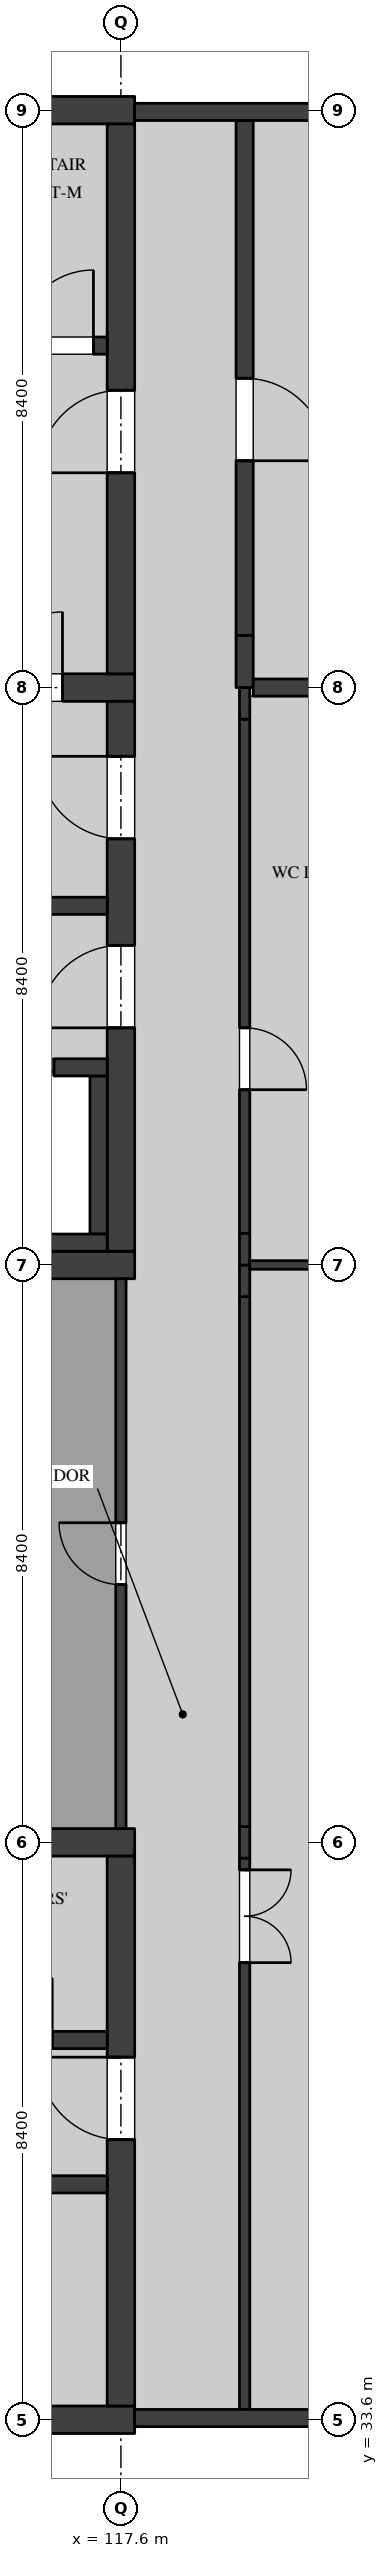
"""IFC4 building model, lengths in metres.
Left out: names, types, materials, properties, quantities, classifications, styles, units other than length and angle.
Written with IfcOpenShell. Run it as: python <this file> out.ifc"""

import sys

from ifc_helpers import new_model, si_unit, direction, frame, frame_2d, origin, place, context, subcontext, project, spatial, rectangle, extrude, element, fill, save


model = new_model("IFC4")
c1 = context("Model", 3, precision=1e-05, world=origin(), true_north=direction((0.0, 1.0)))
c2 = subcontext(c1, "Body", "Model", "MODEL_VIEW")
j1 = project(units=[si_unit("LENGTHUNIT", "METRE"), si_unit("PLANEANGLEUNIT", "RADIAN")], contexts=[c1])
p1 = place(None, origin())
s1 = spatial("IfcSite", under=j1, at=p1, CompositionType="ELEMENT")
p2 = place(p1, origin())
s2 = spatial("IfcBuilding", under=s1, at=p2, CompositionType="ELEMENT")
p3 = place(p2, frame((0.0, 0.0, 23.4)))
s3 = spatial("IfcBuildingStorey", under=s2, at=p3, CompositionType="ELEMENT", Elevation=23.4)
p4 = place(p3, frame((109.0, 50.4, 0.0), z_axis=(0.0, 0.0, 1.0), x_axis=(1.0, 0.0, 0.0)))
e1 = element("IfcWall", 1, at=p4, inside=s3, PredefinedType="SHEAR", context=c2, shape_type="SweptSolid", body=[
    extrude(rectangle(XDim=8.8, YDim=0.4, at=frame_2d((4.4, 0.0))), origin(), (0.0, 0.0, 1.0), 4.37),
])
p5 = place(p3, frame((109.0, 58.8, 0.0), z_axis=(0.0, 0.0, 1.0), x_axis=(1.0, 0.0, 0.0)))
e2 = element("IfcWall", 2, at=p5, inside=s3, PredefinedType="SHEAR", context=c2, shape_type="SweptSolid", body=[
    extrude(rectangle(XDim=8.8, YDim=0.4, at=frame_2d((4.4, 0.0))), origin(), (0.0, 0.0, 1.0), 4.37),
])
p6 = place(p5, frame((6.65, 0.0, 0.0)))
e3 = element("IfcOpeningElement", 3, at=p6, cuts=e2, PredefinedType="OPENING", context=c2, shape_type="SweptSolid", body=[
    extrude(rectangle(XDim=1.1, YDim=2.1, at=frame_2d((0.55, 1.05))), frame((0.0, 0.21, 0.0), z_axis=(0.0, -1.0, 0.0), x_axis=(1.0, 0.0, 0.0)), (0.0, 0.0, 1.0), 0.42),
])
p7 = place(p3, frame((117.6, 50.6, 0.0), z_axis=(0.0, 0.0, 1.0), x_axis=(0.0, 1.0, 0.0)))
e4 = element("IfcWall", 4, at=p7, inside=s3, PredefinedType="SHEAR", context=c2, shape_type="SweptSolid", body=[
    extrude(rectangle(XDim=8.0, YDim=0.4, at=frame_2d((4.0, 0.0))), origin(), (0.0, 0.0, 1.0), 4.37),
])
p8 = place(p7, frame((3.25, 0.0, 0.0)))
e5 = element("IfcOpeningElement", 5, at=p8, cuts=e4, PredefinedType="OPENING", context=c2, shape_type="SweptSolid", body=[
    extrude(rectangle(XDim=1.2, YDim=2.1, at=frame_2d((0.6, 1.05))), frame((0.0, 0.21, 0.0), z_axis=(0.0, -1.0, 0.0), x_axis=(1.0, 0.0, 0.0)), (0.0, 0.0, 1.0), 0.42),
])
p9 = place(p7, frame((6.0, 0.0, 0.0)))
e6 = element("IfcOpeningElement", 6, at=p9, cuts=e4, PredefinedType="OPENING", context=c2, shape_type="SweptSolid", body=[
    extrude(rectangle(XDim=1.2, YDim=2.1, at=frame_2d((0.6, 1.05))), frame((0.0, 0.21, 0.0), z_axis=(0.0, -1.0, 0.0), x_axis=(1.0, 0.0, 0.0)), (0.0, 0.0, 1.0), 0.42),
])
p10 = place(p3, frame((114.75, 55.625, 0.0), z_axis=(0.0, 0.0, 1.0), x_axis=(1.0, 0.0, 0.0)))
e7 = element("IfcWall", 7, at=p10, inside=s3, PredefinedType="SOLIDWALL", context=c2, shape_type="SweptSolid", body=[
    extrude(rectangle(XDim=2.65, YDim=0.25, at=frame_2d((1.325, 0.0))), origin(), (0.0, 0.0, 1.0), 4.37),
])
p11 = place(p3, frame((109.0, 67.2, 0.0), z_axis=(0.0, 0.0, 1.0), x_axis=(1.0, 0.0, 0.0)))
e8 = element("IfcWall", 8, at=p11, inside=s3, PredefinedType="SHEAR", context=c2, shape_type="SweptSolid", body=[
    extrude(rectangle(XDim=8.8, YDim=0.4, at=frame_2d((4.4, 0.0))), origin(), (0.0, 0.0, 1.0), 4.37),
])
p12 = place(p3, frame((117.6, 59.0, 0.0), z_axis=(0.0, 0.0, 1.0), x_axis=(0.0, 1.0, 0.0)))
e9 = element("IfcWall", 9, at=p12, inside=s3, PredefinedType="SHEAR", context=c2, shape_type="SweptSolid", body=[
    extrude(rectangle(XDim=8.0, YDim=0.4, at=frame_2d((4.0, 0.0))), origin(), (0.0, 0.0, 1.0), 4.37),
])
p13 = place(p12, frame((2.925, 0.0, 0.0)))
e10 = element("IfcOpeningElement", 10, at=p13, cuts=e9, PredefinedType="OPENING", context=c2, shape_type="SweptSolid", body=[
    extrude(rectangle(XDim=1.2, YDim=2.1, at=frame_2d((0.6, 1.05))), frame((0.0, 0.21, 0.0), z_axis=(0.0, -1.0, 0.0), x_axis=(1.0, 0.0, 0.0)), (0.0, 0.0, 1.0), 0.42),
])
p14 = place(p3, frame((117.4, 63.775, 0.0), z_axis=(0.0, 0.0, 1.0), x_axis=(-1.0, 0.0, 0.0)))
e11 = element("IfcWall", 11, at=p14, inside=s3, PredefinedType="SOLIDWALL", context=c2, shape_type="SweptSolid", body=[
    extrude(rectangle(XDim=8.0, YDim=0.25, at=frame_2d((4.0, 0.0))), origin(), (0.0, 0.0, 1.0), 4.37),
])
p15 = place(p14, frame((0.2, 0.0, 0.0)))
e12 = element("IfcOpeningElement", 12, at=p15, cuts=e11, PredefinedType="OPENING", context=c2, shape_type="SweptSolid", body=[
    extrude(rectangle(XDim=1.1, YDim=2.1, at=frame_2d((0.55, 1.05))), frame((0.0, 0.135, 0.0), z_axis=(0.0, -1.0, 0.0), x_axis=(1.0, 0.0, 0.0)), (0.0, 0.0, 1.0), 0.27),
])
for number, where, z_axis, x_axis in (
    (13, (109.0, 33.6, 0.0), (0.0, 0.0, 1.0), (1.0, 0.0, 0.0)),
    (14, (109.0, 42.0, 0.0), (0.0, 0.0, 1.0), (1.0, 0.0, 0.0)),
):
    element("IfcWall", number, at=place(p3, frame(where, z_axis=z_axis, x_axis=x_axis)), inside=s3, PredefinedType="SHEAR", context=c2, shape_type="SweptSolid", body=[
        extrude(rectangle(XDim=8.8, YDim=0.4, at=frame_2d((4.4, 0.0))), origin(), (0.0, 0.0, 1.0), 4.37),
    ])
p16 = place(p3, frame((117.6, 33.8, 0.0), z_axis=(0.0, 0.0, 1.0), x_axis=(0.0, 1.0, 0.0)))
e15 = element("IfcWall", 15, at=p16, inside=s3, PredefinedType="SHEAR", context=c2, shape_type="SweptSolid", body=[
    extrude(rectangle(XDim=8.0, YDim=0.4, at=frame_2d((4.0, 0.0))), origin(), (0.0, 0.0, 1.0), 4.37),
])
p17 = place(p16, frame((3.875, 0.0, 0.0)))
e16 = element("IfcOpeningElement", 16, at=p17, cuts=e15, PredefinedType="OPENING", context=c2, shape_type="SweptSolid", body=[
    extrude(rectangle(XDim=1.2, YDim=2.1, at=frame_2d((0.6, 1.05))), frame((0.0, 0.21, 0.0), z_axis=(0.0, -1.0, 0.0), x_axis=(1.0, 0.0, 0.0)), (0.0, 0.0, 1.0), 0.42),
])
p18 = place(p3, frame((109.4, 37.025, 0.0), z_axis=(0.0, 0.0, 1.0), x_axis=(1.0, 0.0, 0.0)))
e17 = element("IfcWall", 17, at=p18, inside=s3, PredefinedType="SOLIDWALL", context=c2, shape_type="SweptSolid", body=[
    extrude(rectangle(XDim=8.0, YDim=0.25, at=frame_2d((4.0, 0.0))), origin(), (0.0, 0.0, 1.0), 4.37),
])
p19 = place(p18, frame((0.2, 0.0, 0.0)))
e18 = element("IfcOpeningElement", 18, at=p19, cuts=e17, PredefinedType="OPENING", context=c2, shape_type="SweptSolid", body=[
    extrude(rectangle(XDim=1.1, YDim=2.1, at=frame_2d((0.55, 1.05))), frame((0.0, 0.135, 0.0), z_axis=(0.0, -1.0, 0.0), x_axis=(1.0, 0.0, 0.0)), (0.0, 0.0, 1.0), 0.27),
])
p20 = place(p3, frame((112.05, 39.125, 0.0), z_axis=(0.0, 0.0, 1.0), x_axis=(1.0, 0.0, 0.0)))
e19 = element("IfcWall", 19, at=p20, inside=s3, PredefinedType="SOLIDWALL", context=c2, shape_type="SweptSolid", body=[
    extrude(rectangle(XDim=5.35, YDim=0.25, at=frame_2d((2.675, 0.0))), origin(), (0.0, 0.0, 1.0), 4.37),
])
p21 = place(p20, frame((3.65, 0.0, 0.0)))
e20 = element("IfcOpeningElement", 20, at=p21, cuts=e19, PredefinedType="OPENING", context=c2, shape_type="SweptSolid", body=[
    extrude(rectangle(XDim=0.9, YDim=2.1, at=frame_2d((0.45, 1.05))), frame((0.0, 0.135, 0.0), z_axis=(0.0, -1.0, 0.0), x_axis=(1.0, 0.0, 0.0)), (0.0, 0.0, 1.0), 0.27),
])
p22 = place(p20, frame((0.9, 0.0, 0.0)))
e21 = element("IfcOpeningElement", 21, at=p22, cuts=e19, PredefinedType="OPENING", context=c2, shape_type="SweptSolid", body=[
    extrude(rectangle(XDim=0.8, YDim=2.1, at=frame_2d((0.4, 1.05))), frame((0.0, 0.135, 0.0), z_axis=(0.0, -1.0, 0.0), x_axis=(1.0, 0.0, 0.0)), (0.0, 0.0, 1.0), 0.27),
])
p23 = place(p3, frame((117.275, 50.85, 0.0), z_axis=(0.0, 0.0, 1.0), x_axis=(0.0, 1.0, 0.0)))
e22 = element("IfcWall", 22, at=p23, inside=s3, PredefinedType="SOLIDWALL", context=c2, shape_type="SweptSolid", body=[
    extrude(rectangle(XDim=2.3, YDim=0.25, at=frame_2d((1.15, 0.0))), origin(), (0.0, 0.0, 1.0), 4.37),
])
p24 = place(p3, frame((114.75, 53.275, 0.0), z_axis=(0.0, 0.0, 1.0), x_axis=(1.0, 0.0, 0.0)))
e23 = element("IfcWall", 23, at=p24, inside=s3, PredefinedType="SOLIDWALL", context=c2, shape_type="SweptSolid", body=[
    extrude(rectangle(XDim=2.65, YDim=0.25, at=frame_2d((1.325, 0.0))), origin(), (0.0, 0.0, 1.0), 4.37),
])
p25 = place(p24, frame((0.775, 0.0, 0.0)))
e24 = element("IfcOpeningElement", 24, at=p25, cuts=e23, PredefinedType="OPENING", context=c2, shape_type="SweptSolid", body=[
    extrude(rectangle(XDim=1.1, YDim=2.1, at=frame_2d((0.55, 1.05))), frame((0.0, 0.135, 0.0), z_axis=(0.0, -1.0, 0.0), x_axis=(1.0, 0.0, 0.0)), (0.0, 0.0, 1.0), 0.27),
])
p26 = place(p3, frame((114.75, 50.725, 0.0), z_axis=(0.0, 0.0, 1.0), x_axis=(1.0, 0.0, 0.0)))
e25 = element("IfcWall", 25, at=p26, inside=s3, PredefinedType="SOLIDWALL", context=c2, shape_type="SweptSolid", body=[
    extrude(rectangle(XDim=2.65, YDim=0.25, at=frame_2d((1.325, 0.0))), origin(), (0.0, 0.0, 1.0), 4.37),
])
p27 = place(p3, frame((119.4, 33.75, 0.0), z_axis=(0.0, 0.0, 1.0), x_axis=(0.0, 1.0, 0.0)))
e26 = element("IfcWall", 26, at=p27, inside=s3, PredefinedType="PARTITIONING", context=c2, shape_type="SweptSolid", body=[
    extrude(rectangle(XDim=8.02, YDim=0.15, at=frame_2d((4.01, 0.0))), origin(), (0.0, 0.0, 1.0), 4.37),
])
p28 = place(p27, frame((6.5, 0.0, 0.0)))
e27 = element("IfcOpeningElement", 27, at=p28, cuts=e26, PredefinedType="OPENING", context=c2, shape_type="SweptSolid", body=[
    extrude(rectangle(XDim=1.35, YDim=2.1, at=frame_2d((0.675, 1.05))), frame((0.0, 0.085, 0.0), z_axis=(0.0, -1.0, 0.0), x_axis=(1.0, 0.0, 0.0)), (0.0, 0.0, 1.0), 0.17),
])
p29 = place(p3, frame((119.4, 41.77, 0.0), z_axis=(0.0, 0.0, 1.0), x_axis=(0.0, 1.0, 0.0)))
e28 = element("IfcWall", 28, at=p29, inside=s3, PredefinedType="PARTITIONING", context=c2, shape_type="SweptSolid", body=[
    extrude(rectangle(XDim=0.46, YDim=0.15, at=frame_2d((0.23, 0.0))), origin(), (0.0, 0.0, 1.0), 3.746),
])
p30 = place(p3, frame((119.4, 42.23, 0.0), z_axis=(0.0, 0.0, 1.0), x_axis=(0.0, 1.0, 0.0)))
e29 = element("IfcWall", 29, at=p30, inside=s3, PredefinedType="PARTITIONING", context=c2, shape_type="SweptSolid", body=[
    extrude(rectangle(XDim=7.71, YDim=0.15, at=frame_2d((3.855, 0.0))), origin(), (0.0, 0.0, 1.0), 4.37),
])
p31 = place(p3, frame((119.4, 49.94, 0.0), z_axis=(0.0, 0.0, 1.0), x_axis=(0.0, 1.0, 0.0)))
e30 = element("IfcWall", 30, at=p31, inside=s3, PredefinedType="PARTITIONING", context=c2, shape_type="SweptSolid", body=[
    extrude(rectangle(XDim=0.46, YDim=0.15, at=frame_2d((0.23, 0.0))), origin(), (0.0, 0.0, 1.0), 3.746),
])
p32 = place(p3, frame((119.4, 50.4, 0.0), z_axis=(0.0, 0.0, 1.0), x_axis=(0.0, 1.0, 0.0)))
e31 = element("IfcWall", 31, at=p32, inside=s3, PredefinedType="PARTITIONING", context=c2, shape_type="SweptSolid", body=[
    extrude(rectangle(XDim=0.46, YDim=0.15, at=frame_2d((0.23, 0.0))), origin(), (0.0, 0.0, 1.0), 3.746),
])
p33 = place(p3, frame((119.4, 50.86, 0.0), z_axis=(0.0, 0.0, 1.0), x_axis=(0.0, 1.0, 0.0)))
e32 = element("IfcWall", 32, at=p33, inside=s3, PredefinedType="PARTITIONING", context=c2, shape_type="SweptSolid", body=[
    extrude(rectangle(XDim=7.48, YDim=0.15, at=frame_2d((3.74, 0.0))), origin(), (0.0, 0.0, 1.0), 4.37),
])
p34 = place(p33, frame((2.09, 0.0, 0.0)))
e33 = element("IfcOpeningElement", 33, at=p34, cuts=e32, PredefinedType="OPENING", context=c2, shape_type="SweptSolid", body=[
    extrude(rectangle(XDim=0.9, YDim=2.1, at=frame_2d((0.45, 1.05))), frame((0.0, 0.085, 0.0), z_axis=(0.0, -1.0, 0.0), x_axis=(1.0, 0.0, 0.0)), (0.0, 0.0, 1.0), 0.17),
])
p35 = place(p3, frame((119.4, 58.34, 0.0), z_axis=(0.0, 0.0, 1.0), x_axis=(0.0, 1.0, 0.0)))
e34 = element("IfcWall", 34, at=p35, inside=s3, PredefinedType="PARTITIONING", context=c2, shape_type="SweptSolid", body=[
    extrude(rectangle(XDim=0.46, YDim=0.15, at=frame_2d((0.23, 0.0))), origin(), (0.0, 0.0, 1.0), 3.746),
])
p36 = place(p3, frame((119.4, 58.8, 0.0), z_axis=(0.0, 0.0, 1.0), x_axis=(0.0, 1.0, 0.0)))
e35 = element("IfcWall", 35, at=p36, inside=s3, PredefinedType="PARTITIONING", context=c2, shape_type="SweptSolid", body=[
    extrude(rectangle(XDim=0.76, YDim=0.25, at=frame_2d((0.38, 0.0))), origin(), (0.0, 0.0, 1.0), 3.746),
])
p37 = place(p3, frame((119.4, 59.56, 0.0), z_axis=(0.0, 0.0, 1.0), x_axis=(0.0, 1.0, 0.0)))
e36 = element("IfcWall", 36, at=p37, inside=s3, PredefinedType="PARTITIONING", context=c2, shape_type="SweptSolid", body=[
    extrude(rectangle(XDim=7.49, YDim=0.25, at=frame_2d((3.745, 0.0))), origin(), (0.0, 0.0, 1.0), 4.37),
])
p38 = place(p37, frame((2.54, 0.0, 0.0)))
e37 = element("IfcOpeningElement", 37, at=p38, cuts=e36, PredefinedType="OPENING", context=c2, shape_type="SweptSolid", body=[
    extrude(rectangle(XDim=1.2, YDim=2.4, at=frame_2d((0.6, 1.2))), frame((0.0, 0.135, 0.0), z_axis=(0.0, -1.0, 0.0), x_axis=(1.0, 0.0, 0.0)), (0.0, 0.0, 1.0), 0.27),
])
p39 = place(p3, frame((117.6, 42.2, 0.0), z_axis=(0.0, 0.0, 1.0), x_axis=(0.0, 1.0, 0.0)))
e38 = element("IfcWall", 38, at=p39, inside=s3, PredefinedType="PARTITIONING", context=c2, shape_type="SweptSolid", body=[
    extrude(rectangle(XDim=8.0, YDim=0.15, at=frame_2d((4.0, 0.0))), origin(), (0.0, 0.0, 1.0), 3.746),
])
p40 = place(p39, frame((3.55, 0.0, 0.0)))
e39 = element("IfcOpeningElement", 39, at=p40, cuts=e38, PredefinedType="OPENING", context=c2, shape_type="SweptSolid", body=[
    extrude(rectangle(XDim=0.9, YDim=2.1, at=frame_2d((0.45, 1.05))), frame((0.0, 0.085, 0.0), z_axis=(0.0, -1.0, 0.0), x_axis=(1.0, 0.0, 0.0)), (0.0, 0.0, 1.0), 0.17),
])
p41 = place(p3, frame((119.475, 50.4, 0.0), z_axis=(0.0, 0.0, 1.0), x_axis=(1.0, 0.0, 0.0)))
e40 = element("IfcWall", 40, at=p41, inside=s3, PredefinedType="PARTITIONING", context=c2, shape_type="SweptSolid", body=[
    extrude(rectangle(XDim=2.325, YDim=0.125, at=frame_2d((1.163, 0.0))), origin(), (0.0, 0.0, 1.0), 3.746),
])
p42 = place(p3, frame((119.525, 58.8, 0.0), z_axis=(0.0, 0.0, 1.0), x_axis=(1.0, 0.0, 0.0)))
e41 = element("IfcWall", 41, at=p42, inside=s3, PredefinedType="PARTITIONING", context=c2, shape_type="SweptSolid", body=[
    extrude(rectangle(XDim=2.275, YDim=0.25, at=frame_2d((1.138, 0.0))), origin(), (0.0, 0.0, 1.0), 3.746),
])
p43 = place(p3, frame((117.8, 33.625, 0.0), z_axis=(0.0, 0.0, 1.0), x_axis=(1.0, 0.0, 0.0)))
e42 = element("IfcWall", 42, at=p43, inside=s3, PredefinedType="SOLIDWALL", context=c2, shape_type="SweptSolid", body=[
    extrude(rectangle(XDim=8.199, YDim=0.25, at=frame_2d((4.099, 0.0))), origin(), (0.0, 0.0, 1.0), 3.746),
])
p44 = place(p43, frame((5.2, 0.0, 0.9)))
e43 = element("IfcOpeningElement", 43, at=p44, cuts=e42, PredefinedType="OPENING", context=c2, shape_type="SweptSolid", body=[
    extrude(rectangle(XDim=1.8, YDim=1.95, at=frame_2d((0.9, 0.975))), frame((0.0, 0.135, 0.0), z_axis=(0.0, -1.0, 0.0), x_axis=(1.0, 0.0, 0.0)), (0.0, 0.0, 1.0), 0.27),
])
p45 = place(p3, frame((125.997, 67.175, 0.0), z_axis=(0.0, 0.0, 1.0), x_axis=(-1.0, 0.0, 0.0)))
e44 = element("IfcWall", 44, at=p45, inside=s3, PredefinedType="SOLIDWALL", context=c2, shape_type="SweptSolid", body=[
    extrude(rectangle(XDim=8.197, YDim=0.25, at=frame_2d((4.098, 0.0))), origin(), (0.0, 0.0, 1.0), 3.746),
])
p46 = place(p45, frame((1.597, 0.0, 0.0)))
e45 = element("IfcOpeningElement", 45, at=p46, cuts=e44, PredefinedType="OPENING", context=c2, shape_type="SweptSolid", body=[
    extrude(rectangle(XDim=1.0, YDim=2.4, at=frame_2d((0.5, 1.2))), frame((0.0, 0.135, 0.0), z_axis=(0.0, -1.0, 0.0), x_axis=(1.0, 0.0, 0.0)), (0.0, 0.0, 1.0), 0.27),
])
p47 = place(p8, origin())
e46 = element("IfcDoor", 46, at=p47, inside=s3, OperationType="SINGLE_SWING_RIGHT", PredefinedType="DOOR", context=c2, shape_type="SweptSolid", body=[
    extrude(rectangle(XDim=1.2, YDim=2.1, at=frame_2d((0.6, 1.05))), frame((0.0, 0.035, 0.0), z_axis=(0.0, -1.0, 0.0), x_axis=(1.0, 0.0, 0.0)), (0.0, 0.0, 1.0), 0.07),
])
fill(e5, e46)
p48 = place(p9, origin())
e47 = element("IfcDoor", 47, at=p48, inside=s3, OperationType="SINGLE_SWING_LEFT", PredefinedType="DOOR", context=c2, shape_type="SweptSolid", body=[
    extrude(rectangle(XDim=1.2, YDim=2.1, at=frame_2d((0.6, 1.05))), frame((0.0, 0.035, 0.0), z_axis=(0.0, -1.0, 0.0), x_axis=(1.0, 0.0, 0.0)), (0.0, 0.0, 1.0), 0.07),
])
fill(e6, e47)
p49 = place(p6, origin())
e48 = element("IfcDoor", 48, at=p49, inside=s3, OperationType="SINGLE_SWING_LEFT", PredefinedType="DOOR", context=c2, shape_type="SweptSolid", body=[
    extrude(rectangle(XDim=1.1, YDim=2.1, at=frame_2d((0.55, 1.05))), frame((0.0, 0.035, 0.0), z_axis=(0.0, -1.0, 0.0), x_axis=(1.0, 0.0, 0.0)), (0.0, 0.0, 1.0), 0.07),
])
fill(e3, e48)
p50 = place(p13, origin())
e49 = element("IfcDoor", 49, at=p50, inside=s3, OperationType="SINGLE_SWING_RIGHT", PredefinedType="DOOR", context=c2, shape_type="SweptSolid", body=[
    extrude(rectangle(XDim=1.2, YDim=2.1, at=frame_2d((0.6, 1.05))), frame((0.0, 0.035, 0.0), z_axis=(0.0, -1.0, 0.0), x_axis=(1.0, 0.0, 0.0)), (0.0, 0.0, 1.0), 0.07),
])
fill(e10, e49)
p51 = place(p15, frame((1.1, 0.0, 0.0), z_axis=(0.0, 0.0, 1.0), x_axis=(-1.0, 0.0, 0.0)))
e50 = element("IfcDoor", 50, at=p51, inside=s3, OperationType="SINGLE_SWING_LEFT", PredefinedType="DOOR", context=c2, shape_type="SweptSolid", body=[
    extrude(rectangle(XDim=1.1, YDim=2.1, at=frame_2d((0.55, 1.05))), frame((0.0, 0.035, 0.0), z_axis=(0.0, -1.0, 0.0), x_axis=(1.0, 0.0, 0.0)), (0.0, 0.0, 1.0), 0.07),
])
fill(e12, e50)
p52 = place(p17, origin())
e51 = element("IfcDoor", 51, at=p52, inside=s3, OperationType="SINGLE_SWING_LEFT", PredefinedType="DOOR", context=c2, shape_type="SweptSolid", body=[
    extrude(rectangle(XDim=1.2, YDim=2.1, at=frame_2d((0.6, 1.05))), frame((0.0, 0.035, 0.0), z_axis=(0.0, -1.0, 0.0), x_axis=(1.0, 0.0, 0.0)), (0.0, 0.0, 1.0), 0.07),
])
fill(e16, e51)
p53 = place(p25, origin())
e52 = element("IfcDoor", 52, at=p53, inside=s3, OperationType="DOUBLE_DOOR_SLIDING", PredefinedType="DOOR", context=c2, shape_type="SweptSolid", body=[
    extrude(rectangle(XDim=1.1, YDim=2.1, at=frame_2d((0.55, 1.05))), frame((0.0, 0.04, 0.0), z_axis=(0.0, -1.0, 0.0), x_axis=(1.0, 0.0, 0.0)), (0.0, 0.0, 1.0), 0.08),
])
fill(e24, e52)
p54 = place(p28, frame((1.35, 0.0, 0.0), z_axis=(0.0, 0.0, 1.0), x_axis=(-1.0, 0.0, 0.0)))
e53 = element("IfcDoor", 53, at=p54, inside=s3, OperationType="DOUBLE_DOOR_SINGLE_SWING", PredefinedType="DOOR", context=c2, shape_type="SweptSolid", body=[
    extrude(rectangle(XDim=1.35, YDim=2.1, at=frame_2d((0.675, 1.05))), frame((0.0, 0.025, 0.0), z_axis=(0.0, -1.0, 0.0), x_axis=(1.0, 0.0, 0.0)), (0.0, 0.0, 1.0), 0.05),
])
fill(e27, e53)
p55 = place(p34, frame((0.9, 0.0, 0.0), z_axis=(0.0, 0.0, 1.0), x_axis=(-1.0, 0.0, 0.0)))
e54 = element("IfcDoor", 54, at=p55, inside=s3, OperationType="SINGLE_SWING_LEFT", PredefinedType="DOOR", context=c2, shape_type="SweptSolid", body=[
    extrude(rectangle(XDim=0.9, YDim=2.1, at=frame_2d((0.45, 1.05))), frame((0.0, 0.025, 0.0), z_axis=(0.0, -1.0, 0.0), x_axis=(1.0, 0.0, 0.0)), (0.0, 0.0, 1.0), 0.05),
])
fill(e33, e54)
p56 = place(p38, frame((1.2, 0.0, 0.0), z_axis=(0.0, 0.0, 1.0), x_axis=(-1.0, 0.0, 0.0)))
e55 = element("IfcDoor", 55, at=p56, inside=s3, OperationType="SINGLE_SWING_LEFT", PredefinedType="DOOR", context=c2, shape_type="SweptSolid", body=[
    extrude(rectangle(XDim=1.2, YDim=2.4, at=frame_2d((0.6, 1.2))), frame((0.0, 0.05, 0.0), z_axis=(0.0, -1.0, 0.0), x_axis=(1.0, 0.0, 0.0)), (0.0, 0.0, 1.0), 0.1),
])
fill(e37, e55)
p57 = place(p40, origin())
e56 = element("IfcDoor", 56, at=p57, inside=s3, OperationType="SINGLE_SWING_LEFT", PredefinedType="DOOR", context=c2, shape_type="SweptSolid", body=[
    extrude(rectangle(XDim=0.9, YDim=2.1, at=frame_2d((0.45, 1.05))), frame((0.0, 0.025, 0.0), z_axis=(0.0, -1.0, 0.0), x_axis=(1.0, 0.0, 0.0)), (0.0, 0.0, 1.0), 0.05),
])
fill(e39, e56)
save(model, sys.argv[1])
